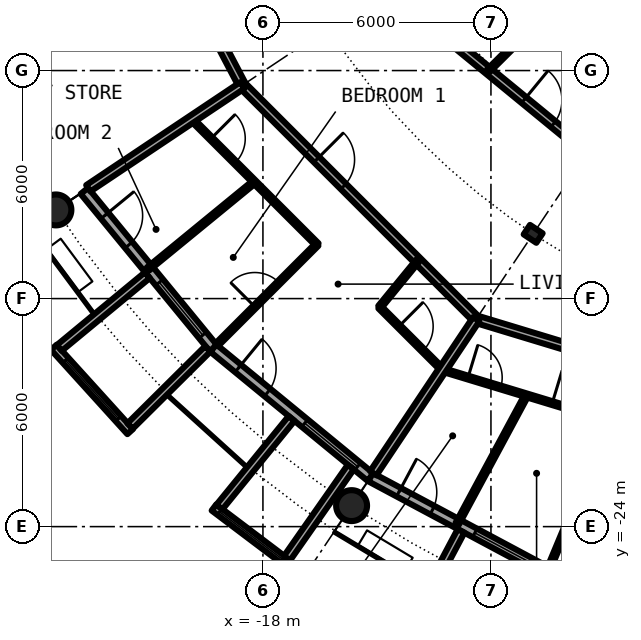
"""IFC4 building model, lengths in metres.
Left out: names, types, materials, properties, quantities, classifications, styles, units other than length and angle.
Written with IfcOpenShell. Run it as: python <this file> out.ifc"""

import sys

from ifc_helpers import new_model, si_unit, direction, frame, frame_2d, origin, origin_2d, place, context, subcontext, project, spatial, rectangle, circle, hollow_circle, i_section, extrude, element, fill, save


model = new_model("IFC4")
c1 = context("Model", 3, precision=1e-05, world=origin(), true_north=direction((0.0, 1.0)))
c2 = subcontext(c1, "Body", "Model", "MODEL_VIEW")
j1 = project(units=[si_unit("LENGTHUNIT", "METRE"), si_unit("PLANEANGLEUNIT", "RADIAN")], contexts=[c1])
p1 = place(None, origin())
s1 = spatial("IfcSite", under=j1, at=p1, CompositionType="ELEMENT")
p2 = place(p1, origin())
s2 = spatial("IfcBuilding", under=s1, at=p2, CompositionType="ELEMENT")
p3 = place(p2, frame((0.0, 0.0, 196.3)))
s3 = spatial("IfcBuildingStorey", under=s2, at=p3, CompositionType="ELEMENT", Elevation=196.3)
for number, where, z_axis, x_axis in (
    (1, (-23.448, -15.667, 0.0), (0.0, 0.0, 1.0), (1.0, 0.0, 0.0)),
    (2, (-15.667, -23.448, 0.0), (0.0, 0.0, 1.0), (1.0, 0.0, 0.0)),
):
    element("IfcColumn", number, at=place(p3, frame(where, z_axis=z_axis, x_axis=x_axis)), inside=s3, PredefinedType="COLUMN", context=c2, shape_type="SweptSolid", body=[
        extrude(hollow_circle(Radius=0.406, WallThickness=0.03, at=origin_2d()), origin(), (0.0, 0.0, 1.0), 3.05),
    ])
p4 = place(p3, frame((-10.889, -16.297, 0.0), z_axis=(0.0, 0.0, 1.0), x_axis=(-0.55557023302, -0.831469612303, 0.0)))
e3 = element("IfcColumn", 3, at=p4, inside=s3, PredefinedType="COLUMN", context=c2, shape_type="SweptSolid", body=[
    extrude(i_section(OverallWidth=0.3, OverallDepth=0.4, WebThickness=0.013, FlangeThickness=0.024, FilletRadius=0.027, at=origin_2d()), origin(), (0.0, 0.0, 1.0), 3.05),
])
p5 = place(p3, frame((-22.699, -15.167, 0.0), z_axis=(0.0, 0.0, 1.0), x_axis=(0.634382322723, -0.773019449054, 0.0)))
e4 = element("IfcWall", 4, at=p5, inside=s3, PredefinedType="SOLIDWALL", context=c2, shape_type="SweptSolid", body=[
    extrude(rectangle(XDim=5.352, YDim=0.25, at=frame_2d((2.676, 0.0))), origin(), (0.0, 0.0, 1.0), 2.7),
])
p6 = place(p5, frame((0.841, 0.0, 0.0)))
e5 = element("IfcOpeningElement", 5, at=p6, cuts=e4, PredefinedType="OPENING", context=c2, shape_type="SweptSolid", body=[
    extrude(rectangle(XDim=1.0, YDim=2.2, at=frame_2d((0.5, 1.1))), frame((0.0, 0.135, 0.0), z_axis=(0.0, -1.0, 0.0), x_axis=(1.0, 0.0, 0.0)), (0.0, 0.0, 1.0), 0.27),
])
p7 = place(p5, frame((3.111, 0.0, 0.3)))
e6 = element("IfcOpeningElement", 6, at=p7, cuts=e4, PredefinedType="OPENING", context=c2, shape_type="SweptSolid", body=[
    extrude(rectangle(XDim=1.8, YDim=2.1, at=frame_2d((0.9, 1.05))), frame((0.0, 0.135, 0.0), z_axis=(0.0, -1.0, 0.0), x_axis=(1.0, 0.0, 0.0)), (0.0, 0.0, 1.0), 0.27),
])
p8 = place(p3, frame((-23.503, -19.282, -0.03), z_axis=(0.0, 0.0, 1.0), x_axis=(0.671506829416, -0.740998365753, 0.0)))
e7 = element("IfcWall", 7, at=p8, inside=s3, PredefinedType="SOLIDWALL", context=c2, shape_type="SweptSolid", body=[
    extrude(rectangle(XDim=2.993, YDim=0.2, at=frame_2d((1.497, 0.0))), origin(), (0.0, 0.0, 1.0), 2.73),
])
p9 = place(p8, frame((0.457, 0.0, 0.33)))
e8 = element("IfcOpeningElement", 8, at=p9, cuts=e7, PredefinedType="OPENING", context=c2, shape_type="SweptSolid", body=[
    extrude(circle(Radius=1.04, at=frame_2d((1.04, 1.04))), frame((0.0, 0.11, 0.0), z_axis=(0.0, -1.0, 0.0), x_axis=(1.0, 0.0, 0.0)), (0.0, 0.0, 1.0), 0.22),
])
p10 = place(p3, frame((-21.041, -17.384, -0.03), z_axis=(0.0, 0.0, 1.0), x_axis=(-0.770784861449, -0.63709551667, 0.0)))
e9 = element("IfcWall", 9, at=p10, inside=s3, PredefinedType="SOLIDWALL", context=c2, shape_type="SweptSolid", body=[
    extrude(rectangle(XDim=3.006, YDim=0.2, at=frame_2d((1.503, 0.0))), origin(), (0.0, 0.0, 1.0), 2.73),
])
p11 = place(p3, frame((-19.45, -19.323, -0.03), z_axis=(0.0, 0.0, 1.0), x_axis=(-0.709727076896, -0.704476739375, 0.0)))
e10 = element("IfcWall", 10, at=p11, inside=s3, PredefinedType="SOLIDWALL", context=c2, shape_type="SweptSolid", body=[
    extrude(rectangle(XDim=2.883, YDim=0.2, at=frame_2d((1.441, 0.0))), origin(), (0.0, 0.0, 1.0), 2.73),
])
p12 = place(p3, frame((-19.304, -19.304, 0.0), z_axis=(0.0, 0.0, 1.0), x_axis=(0.773019449054, -0.634382322723, 0.0)))
e11 = element("IfcWall", 11, at=p12, inside=s3, PredefinedType="SOLIDWALL", context=c2, shape_type="SweptSolid", body=[
    extrude(rectangle(XDim=5.352, YDim=0.25, at=frame_2d((2.676, 0.0))), origin(), (0.0, 0.0, 1.0), 2.7),
])
p13 = place(p12, frame((0.841, 0.0, 0.0)))
e12 = element("IfcOpeningElement", 12, at=p13, cuts=e11, PredefinedType="OPENING", context=c2, shape_type="SweptSolid", body=[
    extrude(rectangle(XDim=1.0, YDim=2.2, at=frame_2d((0.5, 1.1))), frame((0.0, 0.135, 0.0), z_axis=(0.0, -1.0, 0.0), x_axis=(1.0, 0.0, 0.0)), (0.0, 0.0, 1.0), 0.27),
])
p14 = place(p12, frame((3.111, 0.0, 0.3)))
e13 = element("IfcOpeningElement", 13, at=p14, cuts=e11, PredefinedType="OPENING", context=c2, shape_type="SweptSolid", body=[
    extrude(rectangle(XDim=1.8, YDim=2.1, at=frame_2d((0.9, 1.05))), frame((0.0, 0.135, 0.0), z_axis=(0.0, -1.0, 0.0), x_axis=(1.0, 0.0, 0.0)), (0.0, 0.0, 1.0), 0.27),
])
p15 = place(p3, frame((-19.289, -23.497, -0.03), z_axis=(0.0, 0.0, 1.0), x_axis=(0.797887588059, -0.602806268067, 0.0)))
e14 = element("IfcWall", 14, at=p15, inside=s3, PredefinedType="SOLIDWALL", context=c2, shape_type="SweptSolid", body=[
    extrude(rectangle(XDim=2.447, YDim=0.2, at=frame_2d((1.223, 0.0))), origin(), (0.0, 0.0, 1.0), 2.73),
])
p16 = place(p15, frame((0.183, 0.0, 0.33)))
e15 = element("IfcOpeningElement", 15, at=p16, cuts=e14, PredefinedType="OPENING", context=c2, shape_type="SweptSolid", body=[
    extrude(circle(Radius=1.04, at=frame_2d((1.04, 1.04))), frame((0.0, 0.11, 0.0), z_axis=(0.0, -1.0, 0.0), x_axis=(1.0, 0.0, 0.0)), (0.0, 0.0, 1.0), 0.22),
])
p17 = place(p3, frame((-17.246, -21.155, -0.03), z_axis=(0.0, 0.0, 1.0), x_axis=(-0.631741648902, -0.775179004516, 0.0)))
e16 = element("IfcWall", 16, at=p17, inside=s3, PredefinedType="SOLIDWALL", context=c2, shape_type="SweptSolid", body=[
    extrude(rectangle(XDim=3.006, YDim=0.2, at=frame_2d((1.503, 0.0))), origin(), (0.0, 0.0, 1.0), 2.73),
])
p18 = place(p3, frame((-15.688, -22.433, -0.03), z_axis=(0.0, 0.0, 1.0), x_axis=(-0.573260687834, -0.819373043115, 0.0)))
e17 = element("IfcWall", 17, at=p18, inside=s3, PredefinedType="SOLIDWALL", context=c2, shape_type="SweptSolid", body=[
    extrude(rectangle(XDim=2.925, YDim=0.2, at=frame_2d((1.463, 0.0))), origin(), (0.0, 0.0, 1.0), 2.73),
])
p19 = place(p3, frame((-15.167, -22.699, 0.0), z_axis=(0.0, 0.0, 1.0), x_axis=(0.881915646801, -0.471407246368, 0.0)))
e18 = element("IfcWall", 18, at=p19, inside=s3, PredefinedType="SOLIDWALL", context=c2, shape_type="SweptSolid", body=[
    extrude(rectangle(XDim=5.352, YDim=0.25, at=frame_2d((2.676, 0.0))), origin(), (0.0, 0.0, 1.0), 2.7),
])
p20 = place(p19, frame((0.841, 0.0, 0.0)))
e19 = element("IfcOpeningElement", 19, at=p20, cuts=e18, PredefinedType="OPENING", context=c2, shape_type="SweptSolid", body=[
    extrude(rectangle(XDim=1.0, YDim=2.2, at=frame_2d((0.5, 1.1))), frame((0.0, 0.135, 0.0), z_axis=(0.0, -1.0, 0.0), x_axis=(1.0, 0.0, 0.0)), (0.0, 0.0, 1.0), 0.27),
])
p21 = place(p19, frame((3.111, 0.0, 0.3)))
e20 = element("IfcOpeningElement", 20, at=p21, cuts=e18, PredefinedType="OPENING", context=c2, shape_type="SweptSolid", body=[
    extrude(rectangle(XDim=1.8, YDim=2.1, at=frame_2d((0.9, 1.05))), frame((0.0, 0.135, 0.0), z_axis=(0.0, -1.0, 0.0), x_axis=(1.0, 0.0, 0.0)), (0.0, 0.0, 1.0), 0.27),
])
p22 = place(p3, frame((-12.787, -24.113, -0.03), z_axis=(0.0, 0.0, 1.0), x_axis=(-0.468365282436, -0.883534924159, 0.0)))
e21 = element("IfcWall", 21, at=p22, inside=s3, PredefinedType="SOLIDWALL", context=c2, shape_type="SweptSolid", body=[
    extrude(rectangle(XDim=3.006, YDim=0.2, at=frame_2d((1.503, 0.0))), origin(), (0.0, 0.0, 1.0), 2.73),
])
p23 = place(p3, frame((-19.869, -13.285, 0.0), z_axis=(0.0, 0.0, 1.0), x_axis=(0.707290020325, -0.706923494552, 0.0)))
e22 = element("IfcWall", 22, at=p23, inside=s3, PredefinedType="PARTITIONING", context=c2, shape_type="SweptSolid", body=[
    extrude(rectangle(XDim=4.663, YDim=0.1, at=frame_2d((2.331, 0.0))), origin(), (0.0, 0.0, 1.0), 2.7),
])
p24 = place(p23, frame((0.712, 0.0, 0.0)))
e23 = element("IfcOpeningElement", 23, at=p24, cuts=e22, PredefinedType="OPENING", context=c2, shape_type="SweptSolid", body=[
    extrude(rectangle(XDim=0.9, YDim=2.3, at=frame_2d((0.45, 1.15))), frame((0.0, 0.06, 0.0), z_axis=(0.0, -1.0, 0.0), x_axis=(1.0, 0.0, 0.0)), (0.0, 0.0, 1.0), 0.12),
])
p25 = place(p3, frame((-14.927, -18.224, 0.0), z_axis=(0.0, 0.0, 1.0), x_axis=(0.707316201218, -0.706897299114, 0.0)))
e24 = element("IfcWall", 24, at=p25, inside=s3, PredefinedType="PARTITIONING", context=c2, shape_type="SweptSolid", body=[
    extrude(rectangle(XDim=2.331, YDim=0.1, at=frame_2d((1.166, 0.0))), origin(), (0.0, 0.0, 1.0), 2.7),
])
p26 = place(p25, frame((0.716, 0.0, 0.0)))
e25 = element("IfcOpeningElement", 25, at=p26, cuts=e24, PredefinedType="OPENING", context=c2, shape_type="SweptSolid", body=[
    extrude(rectangle(XDim=0.9, YDim=2.3, at=frame_2d((0.45, 1.15))), frame((0.0, 0.06, 0.0), z_axis=(0.0, -1.0, 0.0), x_axis=(1.0, 0.0, 0.0)), (0.0, 0.0, 1.0), 0.12),
])
p27 = place(p3, frame((-13.279, -19.874, 0.0), z_axis=(0.0, 0.0, 1.0), x_axis=(0.956989789119, -0.290121601266, 0.0)))
e26 = element("IfcWall", 26, at=p27, inside=s3, PredefinedType="PARTITIONING", context=c2, shape_type="SweptSolid", body=[
    extrude(rectangle(XDim=6.942, YDim=0.1, at=frame_2d((3.471, 0.0))), origin(), (0.0, 0.0, 1.0), 2.7),
])
p28 = place(p27, frame((3.022, 0.0, 0.0)))
e27 = element("IfcOpeningElement", 27, at=p28, cuts=e26, PredefinedType="OPENING", context=c2, shape_type="SweptSolid", body=[
    extrude(rectangle(XDim=0.9, YDim=2.3, at=frame_2d((0.45, 1.15))), frame((0.0, 0.06, 0.0), z_axis=(0.0, -1.0, 0.0), x_axis=(1.0, 0.0, 0.0)), (0.0, 0.0, 1.0), 0.12),
])
p29 = place(p27, frame((0.705, 0.0, 0.0)))
e28 = element("IfcOpeningElement", 28, at=p29, cuts=e26, PredefinedType="OPENING", context=c2, shape_type="SweptSolid", body=[
    extrude(rectangle(XDim=0.9, YDim=2.3, at=frame_2d((0.45, 1.15))), frame((0.0, 0.06, 0.0), z_axis=(0.0, -1.0, 0.0), x_axis=(1.0, 0.0, 0.0)), (0.0, 0.0, 1.0), 0.12),
])
p30 = place(p3, frame((-19.317, -10.915, 0.0), z_axis=(0.0, 0.0, 1.0), x_axis=(0.465359652486, -0.885121683068, 0.0)))
e29 = element("IfcWall", 29, at=p30, inside=s3, PredefinedType="PARTITIONING", context=c2, shape_type="SweptSolid", body=[
    extrude(rectangle(XDim=1.665, YDim=0.2, at=frame_2d((0.833, 0.0))), origin(), (0.0, 0.0, 1.0), 2.7),
])
p31 = place(p3, frame((-18.542, -12.389, 0.0), z_axis=(0.0, 0.0, 1.0), x_axis=(0.707106781187, -0.707106781187, 0.0)))
e30 = element("IfcWall", 30, at=p31, inside=s3, PredefinedType="PARTITIONING", context=c2, shape_type="SweptSolid", body=[
    extrude(rectangle(XDim=8.702, YDim=0.2, at=frame_2d((4.351, 0.0))), origin(), (0.0, 0.0, 1.0), 2.7),
])
p32 = place(p31, frame((2.763, 0.0, 0.0)))
e31 = element("IfcOpeningElement", 31, at=p32, cuts=e30, PredefinedType="OPENING", context=c2, shape_type="SweptSolid", body=[
    extrude(rectangle(XDim=1.0, YDim=2.3, at=frame_2d((0.5, 1.15))), frame((0.0, 0.11, 0.0), z_axis=(0.0, -1.0, 0.0), x_axis=(1.0, 0.0, 0.0)), (0.0, 0.0, 1.0), 0.22),
])
p33 = place(p3, frame((-12.389, -18.542, 0.0), z_axis=(0.0, 0.0, 1.0), x_axis=(0.956942051091, -0.290279022415, 0.0)))
e32 = element("IfcWall", 32, at=p33, inside=s3, PredefinedType="PARTITIONING", context=c2, shape_type="SweptSolid", body=[
    extrude(rectangle(XDim=12.946, YDim=0.2, at=frame_2d((6.473, 0.0))), origin(), (0.0, 0.0, 1.0), 2.7),
])
p34 = place(p33, frame((4.895, 0.0, 0.0)))
e33 = element("IfcOpeningElement", 33, at=p34, cuts=e32, PredefinedType="OPENING", context=c2, shape_type="SweptSolid", body=[
    extrude(rectangle(XDim=1.0, YDim=2.3, at=frame_2d((0.5, 1.15))), frame((0.0, 0.11, 0.0), z_axis=(0.0, -1.0, 0.0), x_axis=(1.0, 0.0, 0.0)), (0.0, 0.0, 1.0), 0.22),
])
p35 = place(p3, frame((-14.717, -9.834, 0.0), z_axis=(0.0, 0.0, 1.0), x_axis=(0.773034536097, -0.634363938131, 0.0)))
e34 = element("IfcWall", 34, at=p35, inside=s3, PredefinedType="PARTITIONING", context=c2, shape_type="SweptSolid", body=[
    extrude(rectangle(XDim=10.277, YDim=0.2, at=frame_2d((5.138, 0.0))), origin(), (0.0, 0.0, 1.0), 2.7),
])
p36 = place(p35, frame((4.638, 0.0, 0.0)))
e35 = element("IfcOpeningElement", 35, at=p36, cuts=e34, PredefinedType="OPENING", context=c2, shape_type="SweptSolid", body=[
    extrude(rectangle(XDim=1.0, YDim=2.3, at=frame_2d((0.5, 1.15))), frame((0.0, 0.11, 0.0), z_axis=(0.0, -1.0, 0.0), x_axis=(1.0, 0.0, 0.0)), (0.0, 0.0, 1.0), 0.22),
])
p37 = place(p3, frame((-14.927, -18.224, 0.0), z_axis=(0.0, 0.0, 1.0), x_axis=(0.633861186344, 0.773446828454, 0.0)))
e36 = element("IfcWall", 36, at=p37, inside=s3, PredefinedType="PARTITIONING", context=c2, shape_type="SweptSolid", body=[
    extrude(rectangle(XDim=1.578, YDim=0.1, at=frame_2d((0.789, 0.0))), origin(), (0.0, 0.0, 1.0), 2.7),
])
p38 = place(p3, frame((-22.595, -15.098, 0.0), z_axis=(0.0, 0.0, 1.0), x_axis=(0.831387096605, 0.55569370664, 0.0)))
e37 = element("IfcWall", 37, at=p38, inside=s3, PredefinedType="PARTITIONING", context=c2, shape_type="SweptSolid", body=[
    extrude(rectangle(XDim=4.875, YDim=0.2, at=frame_2d((2.438, 0.0))), origin(), (0.0, 0.0, 1.0), 2.7),
])
p39 = place(p3, frame((-21.023, -17.22, 0.0), z_axis=(0.0, 0.0, 1.0), x_axis=(0.773548271597, 0.633737383709, 0.0)))
e38 = element("IfcWall", 38, at=p39, inside=s3, PredefinedType="PARTITIONING", context=c2, shape_type="SweptSolid", body=[
    extrude(rectangle(XDim=3.618, YDim=0.1, at=frame_2d((1.809, 0.0))), origin(), (0.0, 0.0, 1.0), 2.7),
])
p40 = place(p3, frame((-19.216, -19.216, 0.0), z_axis=(0.0, 0.0, 1.0), x_axis=(0.707106781187, 0.707106781187, 0.0)))
e39 = element("IfcWall", 39, at=p40, inside=s3, PredefinedType="PARTITIONING", context=c2, shape_type="SweptSolid", body=[
    extrude(rectangle(XDim=3.735, YDim=0.1, at=frame_2d((1.868, 0.0))), origin(), (0.0, 0.0, 1.0), 2.7),
])
p41 = place(p40, frame((1.417, 0.0, 0.0)))
e40 = element("IfcOpeningElement", 40, at=p41, cuts=e39, PredefinedType="OPENING", context=c2, shape_type="SweptSolid", body=[
    extrude(rectangle(XDim=0.9, YDim=2.3, at=frame_2d((0.45, 1.15))), frame((0.0, 0.06, 0.0), z_axis=(0.0, -1.0, 0.0), x_axis=(1.0, 0.0, 0.0)), (0.0, 0.0, 1.0), 0.12),
])
p42 = place(p3, frame((-15.096, -22.596, 0.0), z_axis=(0.0, 0.0, 1.0), x_axis=(0.55555521993, 0.831479643532, 0.0)))
e41 = element("IfcWall", 41, at=p42, inside=s3, PredefinedType="PARTITIONING", context=c2, shape_type="SweptSolid", body=[
    extrude(rectangle(XDim=4.875, YDim=0.2, at=frame_2d((2.437, 0.0))), origin(), (0.0, 0.0, 1.0), 2.7),
])
p43 = place(p3, frame((-12.887, -23.925, 0.0), z_axis=(0.0, 0.0, 1.0), x_axis=(0.474281720599, 0.88037313084, 0.0)))
e42 = element("IfcWall", 42, at=p43, inside=s3, PredefinedType="PARTITIONING", context=c2, shape_type="SweptSolid", body=[
    extrude(rectangle(XDim=3.842, YDim=0.1, at=frame_2d((1.921, 0.0))), origin(), (0.0, 0.0, 1.0), 2.7),
])
p44 = place(p3, frame((-12.069, -12.007, 0.0), z_axis=(0.0, 0.0, 1.0), x_axis=(0.708909651863, 0.705299302067, 0.0)))
e43 = element("IfcWall", 43, at=p44, inside=s3, PredefinedType="PARTITIONING", context=c2, shape_type="SweptSolid", body=[
    extrude(rectangle(XDim=4.193, YDim=0.1, at=frame_2d((2.096, 0.0))), origin(), (0.0, 0.0, 1.0), 2.7),
])
p45 = place(p44, frame((1.646, 0.0, 0.0)))
e44 = element("IfcOpeningElement", 44, at=p45, cuts=e43, PredefinedType="OPENING", context=c2, shape_type="SweptSolid", body=[
    extrude(rectangle(XDim=0.9, YDim=2.3, at=frame_2d((0.45, 1.15))), frame((0.0, 0.06, 0.0), z_axis=(0.0, -1.0, 0.0), x_axis=(1.0, 0.0, 0.0)), (0.0, 0.0, 1.0), 0.12),
])
p46 = place(p3, frame((-10.465, -25.079, 0.0), z_axis=(0.0, 0.0, 1.0), x_axis=(0.385232176411, 0.922819684585, 0.0)))
e45 = element("IfcWall", 45, at=p46, inside=s3, PredefinedType="PARTITIONING", context=c2, shape_type="SweptSolid", body=[
    extrude(rectangle(XDim=4.187, YDim=0.1, at=frame_2d((2.094, 0.0))), origin(), (0.0, 0.0, 1.0), 2.7),
])
p47 = place(p6, origin())
e46 = element("IfcDoor", 46, at=p47, inside=s3, OperationType="SINGLE_SWING_LEFT", PredefinedType="DOOR", context=c2, shape_type="SweptSolid", body=[
    extrude(rectangle(XDim=1.0, YDim=2.2, at=frame_2d((0.5, 1.1))), frame((0.0, 0.025, 0.0), z_axis=(0.0, -1.0, 0.0), x_axis=(1.0, 0.0, 0.0)), (0.0, 0.0, 1.0), 0.05),
])
fill(e5, e46)
p48 = place(p7, origin())
e47 = element("IfcWindow", 47, at=p48, inside=s3, PartitioningType="SINGLE_PANEL", PredefinedType="WINDOW", context=c2, shape_type="SweptSolid", body=[
    extrude(rectangle(XDim=1.8, YDim=2.1, at=frame_2d((0.9, 1.05))), frame((0.0, 0.03, 0.0), z_axis=(0.0, -1.0, 0.0), x_axis=(1.0, 0.0, 0.0)), (0.0, 0.0, 1.0), 0.06),
])
fill(e6, e47)
p49 = place(p9, origin())
e48 = element("IfcWindow", 48, at=p49, inside=s3, PartitioningType="SINGLE_PANEL", PredefinedType="WINDOW", context=c2, shape_type="SweptSolid", body=[
    extrude(circle(Radius=1.04, at=frame_2d((1.04, 1.04))), frame((0.0, 0.03, 0.0), z_axis=(0.0, -1.0, 0.0), x_axis=(1.0, 0.0, 0.0)), (0.0, 0.0, 1.0), 0.06),
])
fill(e8, e48)
p50 = place(p13, origin())
e49 = element("IfcDoor", 49, at=p50, inside=s3, OperationType="SINGLE_SWING_LEFT", PredefinedType="DOOR", context=c2, shape_type="SweptSolid", body=[
    extrude(rectangle(XDim=1.0, YDim=2.2, at=frame_2d((0.5, 1.1))), frame((0.0, 0.025, 0.0), z_axis=(0.0, -1.0, 0.0), x_axis=(1.0, 0.0, 0.0)), (0.0, 0.0, 1.0), 0.05),
])
fill(e12, e49)
p51 = place(p14, origin())
e50 = element("IfcWindow", 50, at=p51, inside=s3, PartitioningType="SINGLE_PANEL", PredefinedType="WINDOW", context=c2, shape_type="SweptSolid", body=[
    extrude(rectangle(XDim=1.8, YDim=2.1, at=frame_2d((0.9, 1.05))), frame((0.0, 0.03, 0.0), z_axis=(0.0, -1.0, 0.0), x_axis=(1.0, 0.0, 0.0)), (0.0, 0.0, 1.0), 0.06),
])
fill(e13, e50)
p52 = place(p16, origin())
e51 = element("IfcWindow", 51, at=p52, inside=s3, PartitioningType="SINGLE_PANEL", PredefinedType="WINDOW", context=c2, shape_type="SweptSolid", body=[
    extrude(circle(Radius=1.04, at=frame_2d((1.04, 1.04))), frame((0.0, 0.03, 0.0), z_axis=(0.0, -1.0, 0.0), x_axis=(1.0, 0.0, 0.0)), (0.0, 0.0, 1.0), 0.06),
])
fill(e15, e51)
p53 = place(p20, origin())
e52 = element("IfcDoor", 52, at=p53, inside=s3, OperationType="SINGLE_SWING_LEFT", PredefinedType="DOOR", context=c2, shape_type="SweptSolid", body=[
    extrude(rectangle(XDim=1.0, YDim=2.2, at=frame_2d((0.5, 1.1))), frame((0.0, 0.025, 0.0), z_axis=(0.0, -1.0, 0.0), x_axis=(1.0, 0.0, 0.0)), (0.0, 0.0, 1.0), 0.05),
])
fill(e19, e52)
p54 = place(p21, origin())
e53 = element("IfcWindow", 53, at=p54, inside=s3, PartitioningType="SINGLE_PANEL", PredefinedType="WINDOW", context=c2, shape_type="SweptSolid", body=[
    extrude(rectangle(XDim=1.8, YDim=2.1, at=frame_2d((0.9, 1.05))), frame((0.0, 0.03, 0.0), z_axis=(0.0, -1.0, 0.0), x_axis=(1.0, 0.0, 0.0)), (0.0, 0.0, 1.0), 0.06),
])
fill(e20, e53)
p55 = place(p32, origin())
e54 = element("IfcDoor", 54, at=p55, inside=s3, OperationType="SINGLE_SWING_LEFT", PredefinedType="DOOR", context=c2, shape_type="SweptSolid", body=[
    extrude(rectangle(XDim=1.0, YDim=2.3, at=frame_2d((0.5, 1.15))), frame((0.0, 0.025, 0.0), z_axis=(0.0, -1.0, 0.0), x_axis=(1.0, 0.0, 0.0)), (0.0, 0.0, 1.0), 0.05),
])
fill(e31, e54)
p56 = place(p26, origin())
e55 = element("IfcDoor", 55, at=p56, inside=s3, OperationType="SINGLE_SWING_LEFT", PredefinedType="DOOR", context=c2, shape_type="SweptSolid", body=[
    extrude(rectangle(XDim=0.9, YDim=2.3, at=frame_2d((0.45, 1.15))), frame((0.0, 0.025, 0.0), z_axis=(0.0, -1.0, 0.0), x_axis=(1.0, 0.0, 0.0)), (0.0, 0.0, 1.0), 0.05),
])
fill(e25, e55)
p57 = place(p41, origin())
e56 = element("IfcDoor", 56, at=p57, inside=s3, OperationType="SINGLE_SWING_LEFT", PredefinedType="DOOR", context=c2, shape_type="SweptSolid", body=[
    extrude(rectangle(XDim=0.9, YDim=2.3, at=frame_2d((0.45, 1.15))), frame((0.0, 0.025, 0.0), z_axis=(0.0, -1.0, 0.0), x_axis=(1.0, 0.0, 0.0)), (0.0, 0.0, 1.0), 0.05),
])
fill(e40, e56)
p58 = place(p24, origin())
e57 = element("IfcDoor", 57, at=p58, inside=s3, OperationType="SINGLE_SWING_LEFT", PredefinedType="DOOR", context=c2, shape_type="SweptSolid", body=[
    extrude(rectangle(XDim=0.9, YDim=2.3, at=frame_2d((0.45, 1.15))), frame((0.0, 0.025, 0.0), z_axis=(0.0, -1.0, 0.0), x_axis=(1.0, 0.0, 0.0)), (0.0, 0.0, 1.0), 0.05),
])
fill(e23, e57)
p59 = place(p28, origin())
e58 = element("IfcDoor", 58, at=p59, inside=s3, OperationType="SINGLE_SWING_RIGHT", PredefinedType="DOOR", context=c2, shape_type="SweptSolid", body=[
    extrude(rectangle(XDim=0.9, YDim=2.3, at=frame_2d((0.45, 1.15))), frame((0.0, 0.025, 0.0), z_axis=(0.0, -1.0, 0.0), x_axis=(1.0, 0.0, 0.0)), (0.0, 0.0, 1.0), 0.05),
])
fill(e27, e58)
p60 = place(p29, origin())
e59 = element("IfcDoor", 59, at=p60, inside=s3, OperationType="SINGLE_SWING_LEFT", PredefinedType="DOOR", context=c2, shape_type="SweptSolid", body=[
    extrude(rectangle(XDim=0.9, YDim=2.3, at=frame_2d((0.45, 1.15))), frame((0.0, 0.025, 0.0), z_axis=(0.0, -1.0, 0.0), x_axis=(1.0, 0.0, 0.0)), (0.0, 0.0, 1.0), 0.05),
])
fill(e28, e59)
p61 = place(p36, origin())
e60 = element("IfcDoor", 60, at=p61, inside=s3, OperationType="SINGLE_SWING_LEFT", PredefinedType="DOOR", context=c2, shape_type="SweptSolid", body=[
    extrude(rectangle(XDim=1.0, YDim=2.3, at=frame_2d((0.5, 1.15))), frame((0.0, 0.025, 0.0), z_axis=(0.0, -1.0, 0.0), x_axis=(1.0, 0.0, 0.0)), (0.0, 0.0, 1.0), 0.05),
])
fill(e35, e60)
save(model, sys.argv[1])
